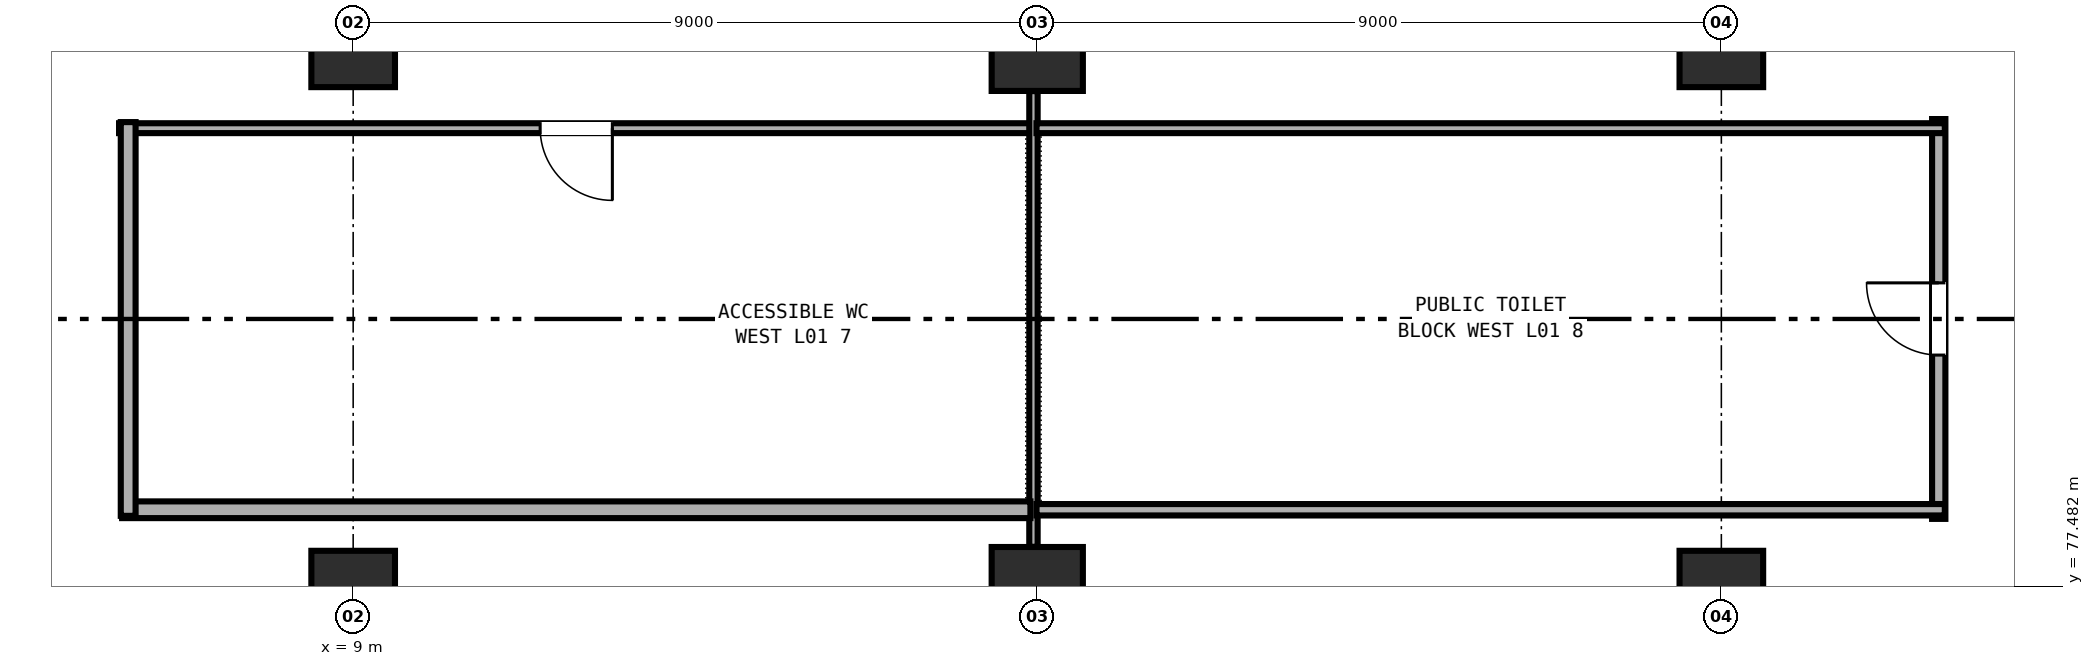
"""IFC4 building model, lengths in metres.
Left out: names, types, materials, properties, quantities, classifications, styles, units other than length and angle.
Written with IfcOpenShell. Run it as: python <this file> out.ifc"""

import sys

from ifc_helpers import new_model, si_unit, direction, frame, frame_2d, origin, origin_2d, place, context, subcontext, project, spatial, rectangle, extrude, element, fill, save


model = new_model("IFC4")
c1 = context("Model", 3, precision=1e-05, world=origin(), true_north=direction((0.0, 1.0)))
c2 = subcontext(c1, "Body", "Model", "MODEL_VIEW")
j1 = project(units=[si_unit("LENGTHUNIT", "METRE"), si_unit("PLANEANGLEUNIT", "RADIAN")], contexts=[c1])
p1 = place(None, origin())
s1 = spatial("IfcSite", under=j1, at=p1, CompositionType="ELEMENT")
p2 = place(p1, origin())
s2 = spatial("IfcBuilding", under=s1, at=p2, CompositionType="ELEMENT")
p3 = place(p2, frame((0.0, 0.0, 4.8)))
s3 = spatial("IfcBuildingStorey", under=s2, at=p3, CompositionType="ELEMENT", Elevation=4.8)
for number, where, z_axis, x_axis in (
    (1, (9.0, 77.4, 0.0), (0.0, 0.0, 1.0), (1.0, 0.0, 0.0)),
    (2, (9.0, 84.6, 0.0), (0.0, 0.0, 1.0), (1.0, 0.0, 0.0)),
):
    element("IfcColumn", number, at=place(p3, frame(where, z_axis=z_axis, x_axis=x_axis)), inside=s3, PredefinedType="COLUMN", context=c2, shape_type="SweptSolid", body=[
        extrude(rectangle(XDim=1.1, YDim=1.1, at=origin_2d()), origin(), (0.0, 0.0, 1.0), 4.8),
    ])
for number, where, z_axis, x_axis in (
    (3, (18.0, 77.4, 0.0), (0.0, 0.0, 1.0), (1.0, 0.0, 0.0)),
    (4, (18.0, 84.6, 0.0), (0.0, 0.0, 1.0), (1.0, 0.0, 0.0)),
):
    element("IfcColumn", number, at=place(p3, frame(where, z_axis=z_axis, x_axis=x_axis)), inside=s3, PredefinedType="COLUMN", context=c2, shape_type="SweptSolid", body=[
        extrude(rectangle(XDim=1.2, YDim=1.2, at=origin_2d()), origin(), (0.0, 0.0, 1.0), 4.8),
    ])
for number, where, z_axis, x_axis in (
    (5, (27.0, 77.4, 0.0), (0.0, 0.0, 1.0), (1.0, 0.0, 0.0)),
    (6, (27.0, 84.6, 0.0), (0.0, 0.0, 1.0), (1.0, 0.0, 0.0)),
):
    element("IfcColumn", number, at=place(p3, frame(where, z_axis=z_axis, x_axis=x_axis)), inside=s3, PredefinedType="COLUMN", context=c2, shape_type="SweptSolid", body=[
        extrude(rectangle(XDim=1.1, YDim=1.1, at=origin_2d()), origin(), (0.0, 0.0, 1.0), 4.8),
    ])
p4 = place(p3, frame((17.95, 83.51, 0.0), z_axis=(0.0, 0.0, 1.0), x_axis=(-1.0, 0.0, 0.0)))
e7 = element("IfcWall", 7, at=p4, inside=s3, PredefinedType="PARTITIONING", context=c2, shape_type="SweptSolid", body=[
    extrude(rectangle(XDim=12.03, YDim=0.13, at=frame_2d((6.015, 0.0))), origin(), (0.0, 0.0, 1.0), 3.28),
])
p5 = place(p4, frame((5.54, 0.0, 0.0)))
e8 = element("IfcOpeningElement", 8, at=p5, cuts=e7, PredefinedType="OPENING", context=c2, shape_type="SweptSolid", body=[
    extrude(rectangle(XDim=0.95, YDim=2.1, at=frame_2d((0.475, 1.05))), frame((0.0, 0.075, 0.0), z_axis=(0.0, -1.0, 0.0), x_axis=(1.0, 0.0, 0.0)), (0.0, 0.0, 1.0), 0.15),
])
p6 = place(p3, frame((17.95, 83.998, 0.0), z_axis=(0.0, 0.0, 1.0), x_axis=(0.0, -1.0, 0.0)))
e9 = element("IfcWall", 9, at=p6, inside=s3, PredefinedType="PARTITIONING", context=c2, shape_type="SweptSolid", body=[
    extrude(rectangle(XDim=5.996, YDim=0.11, at=frame_2d((2.998, 0.0))), origin(), (0.0, 0.0, 1.0), 3.28),
])
p7 = place(p3, frame((17.91, 78.49, 0.0), z_axis=(0.0, 0.0, 1.0), x_axis=(-1.0, 0.0, 0.0)))
e10 = element("IfcWall", 10, at=p7, inside=s3, PredefinedType="PARTITIONING", context=c2, shape_type="SweptSolid", body=[
    extrude(rectangle(XDim=11.95, YDim=0.22, at=frame_2d((5.975, 0.0))), origin(), (0.0, 0.0, 1.0), 3.28),
])
p8 = place(p3, frame((6.04, 78.41, 0.0), z_axis=(0.0, 0.0, 1.0), x_axis=(0.0, 1.0, 0.0)))
e11 = element("IfcWall", 11, at=p8, inside=s3, PredefinedType="PARTITIONING", context=c2, shape_type="SweptSolid", body=[
    extrude(rectangle(XDim=5.18, YDim=0.195, at=frame_2d((2.59, 0.0))), origin(), (0.0, 0.0, 1.0), 3.28),
])
p9 = place(p3, frame((29.86, 78.37, 0.0), z_axis=(0.0, 0.0, 1.0), x_axis=(0.0, 1.0, 0.0)))
e12 = element("IfcWall", 12, at=p9, inside=s3, PredefinedType="PARTITIONING", context=c2, shape_type="SweptSolid", body=[
    extrude(rectangle(XDim=5.26, YDim=0.175, at=frame_2d((2.63, 0.0))), origin(), (0.0, 0.0, 1.0), 3.28),
])
p10 = place(p9, frame((2.155, 0.0, 0.0)))
e13 = element("IfcOpeningElement", 13, at=p10, cuts=e12, PredefinedType="OPENING", context=c2, shape_type="SweptSolid", body=[
    extrude(rectangle(XDim=0.95, YDim=2.18, at=frame_2d((0.475, 1.09))), frame((0.0, 0.097, 0.0), z_axis=(0.0, -1.0, 0.0), x_axis=(1.0, 0.0, 0.0)), (0.0, 0.0, 1.0), 0.195),
])
p11 = place(p3, frame((29.94, 78.49, 0.0), z_axis=(0.0, 0.0, 1.0), x_axis=(-1.0, 0.0, 0.0)))
e14 = element("IfcWall", 14, at=p11, inside=s3, PredefinedType="PARTITIONING", context=c2, shape_type="SweptSolid", body=[
    extrude(rectangle(XDim=11.95, YDim=0.15, at=frame_2d((5.975, 0.0))), origin(), (0.0, 0.0, 1.0), 3.28),
])
p12 = place(p3, frame((17.99, 83.51, 0.0), z_axis=(0.0, 0.0, 1.0), x_axis=(1.0, 0.0, 0.0)))
e15 = element("IfcWall", 15, at=p12, inside=s3, PredefinedType="PARTITIONING", context=c2, shape_type="SweptSolid", body=[
    extrude(rectangle(XDim=11.95, YDim=0.13, at=frame_2d((5.975, 0.0))), origin(), (0.0, 0.0, 1.0), 3.28),
])
p13 = place(p5, origin())
e16 = element("IfcDoor", 16, at=p13, inside=s3, OperationType="SINGLE_SWING_LEFT", PredefinedType="DOOR", context=c2, shape_type="SweptSolid", body=[
    extrude(rectangle(XDim=0.95, YDim=2.1, at=frame_2d((0.475, 1.05))), frame((0.0, 0.025, 0.0), z_axis=(0.0, -1.0, 0.0), x_axis=(1.0, 0.0, 0.0)), (0.0, 0.0, 1.0), 0.05),
])
fill(e8, e16)
p14 = place(p10, origin())
e17 = element("IfcDoor", 17, at=p14, inside=s3, OperationType="SINGLE_SWING_RIGHT", PredefinedType="DOOR", context=c2, shape_type="SweptSolid", body=[
    extrude(rectangle(XDim=0.95, YDim=2.18, at=frame_2d((0.475, 1.09))), frame((0.0, 0.025, 0.0), z_axis=(0.0, -1.0, 0.0), x_axis=(1.0, 0.0, 0.0)), (0.0, 0.0, 1.0), 0.05),
])
fill(e13, e17)
save(model, sys.argv[1])
